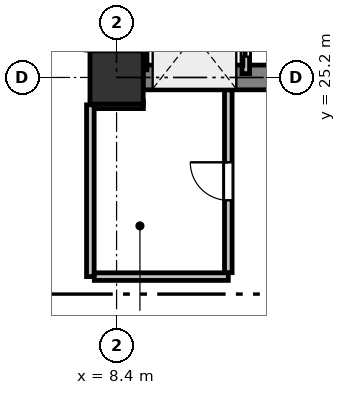
"""IFC4 building model, lengths in metres.
Left out: names, types, materials, properties, quantities, classifications, styles, units other than length and angle.
Written with IfcOpenShell. Run it as: python <this file> out.ifc"""

import sys

from ifc_helpers import new_model, si_unit, direction, frame, frame_2d, origin, origin_2d, place, context, subcontext, project, spatial, rectangle, extrude, element, fill, save


model = new_model("IFC4")
c1 = context("Model", 3, precision=1e-05, world=origin(), true_north=direction((0.0, 1.0)))
c2 = subcontext(c1, "Body", "Model", "MODEL_VIEW")
j1 = project(units=[si_unit("LENGTHUNIT", "METRE"), si_unit("PLANEANGLEUNIT", "RADIAN")], contexts=[c1])
p1 = place(None, origin())
s1 = spatial("IfcSite", under=j1, at=p1, CompositionType="ELEMENT")
p2 = place(p1, origin())
s2 = spatial("IfcBuilding", under=s1, at=p2, CompositionType="ELEMENT")
p3 = place(p2, frame((0.0, 0.0, 79.4)))
s3 = spatial("IfcBuildingStorey", under=s2, at=p3, CompositionType="ELEMENT", Elevation=79.4)
p4 = place(p3, frame((8.4, 25.2, 0.0), z_axis=(0.0, 0.0, 1.0), x_axis=(1.0, 0.0, 0.0)))
e1 = element("IfcColumn", 1, at=p4, inside=s3, PredefinedType="COLUMN", context=c2, shape_type="SweptSolid", body=[
    extrude(rectangle(XDim=1.4, YDim=1.4, at=origin_2d()), origin(), (0.0, 0.0, 1.0), 5.0),
])
p5 = place(p3, frame((9.1, 25.2, 0.0), z_axis=(0.0, 0.0, 1.0), x_axis=(1.0, 0.0, 0.0)))
e2 = element("IfcWall", 2, at=p5, inside=s3, PredefinedType="SHEAR", context=c2, shape_type="SweptSolid", body=[
    extrude(rectangle(XDim=7.0, YDim=0.65, at=frame_2d((3.5, 0.0))), origin(), (0.0, 0.0, 1.0), 4.725),
])
p6 = place(p5, frame((3.6, 0.0, 0.0)))
e3 = element("IfcOpeningElement", 3, at=p6, cuts=e2, PredefinedType="OPENING", context=c2, shape_type="SweptSolid", body=[
    extrude(rectangle(XDim=1.1, YDim=2.15, at=frame_2d((0.55, 1.075))), frame((0.0, 0.335, 0.0), z_axis=(0.0, -1.0, 0.0), x_axis=(1.0, 0.0, 0.0)), (0.0, 0.0, 1.0), 0.67),
])
p7 = place(p3, frame((11.8, 25.3, 0.0), z_axis=(0.0, 0.0, 1.0), x_axis=(0.0, 1.0, 0.0)))
e4 = element("IfcWall", 4, at=p7, inside=s3, PredefinedType="PARTITIONING", context=c2, shape_type="SweptSolid", body=[
    extrude(rectangle(XDim=2.0, YDim=0.2, at=frame_2d((1.0, 0.0))), origin(), (0.0, 0.0, 1.0), 4.725),
])
p8 = place(p7, frame((0.45, 0.0, 0.0)))
e5 = element("IfcOpeningElement", 5, at=p8, cuts=e4, PredefinedType="OPENING", context=c2, shape_type="SweptSolid", body=[
    extrude(rectangle(XDim=1.1, YDim=2.2, at=frame_2d((0.55, 1.1))), frame((0.0, 0.11, 0.0), z_axis=(0.0, -1.0, 0.0), x_axis=(1.0, 0.0, 0.0)), (0.0, 0.0, 1.0), 0.22),
])
p9 = place(p3, frame((9.1, 25.4, 0.0), z_axis=(0.0, 0.0, 1.0), x_axis=(0.0, 1.0, 0.0)))
e6 = element("IfcWall", 6, at=p9, inside=s3, PredefinedType="PARTITIONING", context=c2, shape_type="SweptSolid", body=[
    extrude(rectangle(XDim=1.8, YDim=0.2, at=frame_2d((0.9, 0.0))), origin(), (0.0, 0.0, 1.0), 4.725),
])
p10 = place(p3, frame((9.106, 24.481, 0.0), z_axis=(0.0, 0.0, 1.0), x_axis=(-0.999999755233, -0.000699667487, 0.0)))
e7 = element("IfcWall", 7, at=p10, inside=s3, PredefinedType="PARTITIONING", context=c2, shape_type="SweptSolid", body=[
    extrude(rectangle(XDim=1.396, YDim=0.2, at=frame_2d((0.698, 0.0))), origin(), (0.0, 0.0, 1.0), 3.709),
])
p11 = place(p3, frame((7.71, 24.48, 0.0), z_axis=(0.0, 0.0, 1.0), x_axis=(0.0, -1.0, 0.0)))
e8 = element("IfcWall", 8, at=p11, inside=s3, PredefinedType="PARTITIONING", context=c2, shape_type="SweptSolid", body=[
    extrude(rectangle(XDim=4.52, YDim=0.2, at=frame_2d((2.26, 0.0))), origin(), (0.0, 0.0, 1.0), 4.725),
])
p12 = place(p3, frame((7.814, 19.96, 0.0), z_axis=(0.0, 0.0, 1.0), x_axis=(1.0, 0.0, 0.0)))
e9 = element("IfcWall", 9, at=p12, inside=s3, PredefinedType="PARTITIONING", context=c2, shape_type="SweptSolid", body=[
    extrude(rectangle(XDim=3.526, YDim=0.2, at=frame_2d((1.763, 0.0))), origin(), (0.0, 0.0, 1.0), 3.709),
])
p13 = place(p3, frame((11.34, 20.064, 0.0), z_axis=(0.0, 0.0, 1.0), x_axis=(0.0, 1.0, 0.0)))
e10 = element("IfcWall", 10, at=p13, inside=s3, PredefinedType="PARTITIONING", context=c2, shape_type="SweptSolid", body=[
    extrude(rectangle(XDim=4.807, YDim=0.2, at=frame_2d((2.404, 0.0))), origin(), (0.0, 0.0, 1.0), 4.725),
])
p14 = place(p13, frame((1.904, 0.0, 0.0)))
e11 = element("IfcOpeningElement", 11, at=p14, cuts=e10, PredefinedType="OPENING", context=c2, shape_type="SweptSolid", body=[
    extrude(rectangle(XDim=1.0, YDim=2.15, at=frame_2d((0.5, 1.075))), frame((0.0, 0.11, 0.0), z_axis=(0.0, -1.0, 0.0), x_axis=(1.0, 0.0, 0.0)), (0.0, 0.0, 1.0), 0.22),
])
p15 = place(p8, origin())
e12 = element("IfcDoor", 12, at=p15, inside=s3, OperationType="DOUBLE_DOOR_SLIDING", PredefinedType="DOOR", context=c2, shape_type="SweptSolid", body=[
    extrude(rectangle(XDim=1.1, YDim=2.2, at=frame_2d((0.55, 1.1))), frame((0.0, 0.025, 0.0), z_axis=(0.0, -1.0, 0.0), x_axis=(1.0, 0.0, 0.0)), (0.0, 0.0, 1.0), 0.05),
])
fill(e5, e12)
p16 = place(p14, origin())
e13 = element("IfcDoor", 13, at=p16, inside=s3, OperationType="SINGLE_SWING_RIGHT", PredefinedType="DOOR", context=c2, shape_type="SweptSolid", body=[
    extrude(rectangle(XDim=1.0, YDim=2.15, at=frame_2d((0.5, 1.075))), frame((0.0, 0.025, 0.0), z_axis=(0.0, -1.0, 0.0), x_axis=(1.0, 0.0, 0.0)), (0.0, 0.0, 1.0), 0.05),
])
fill(e11, e13)
save(model, sys.argv[1])
